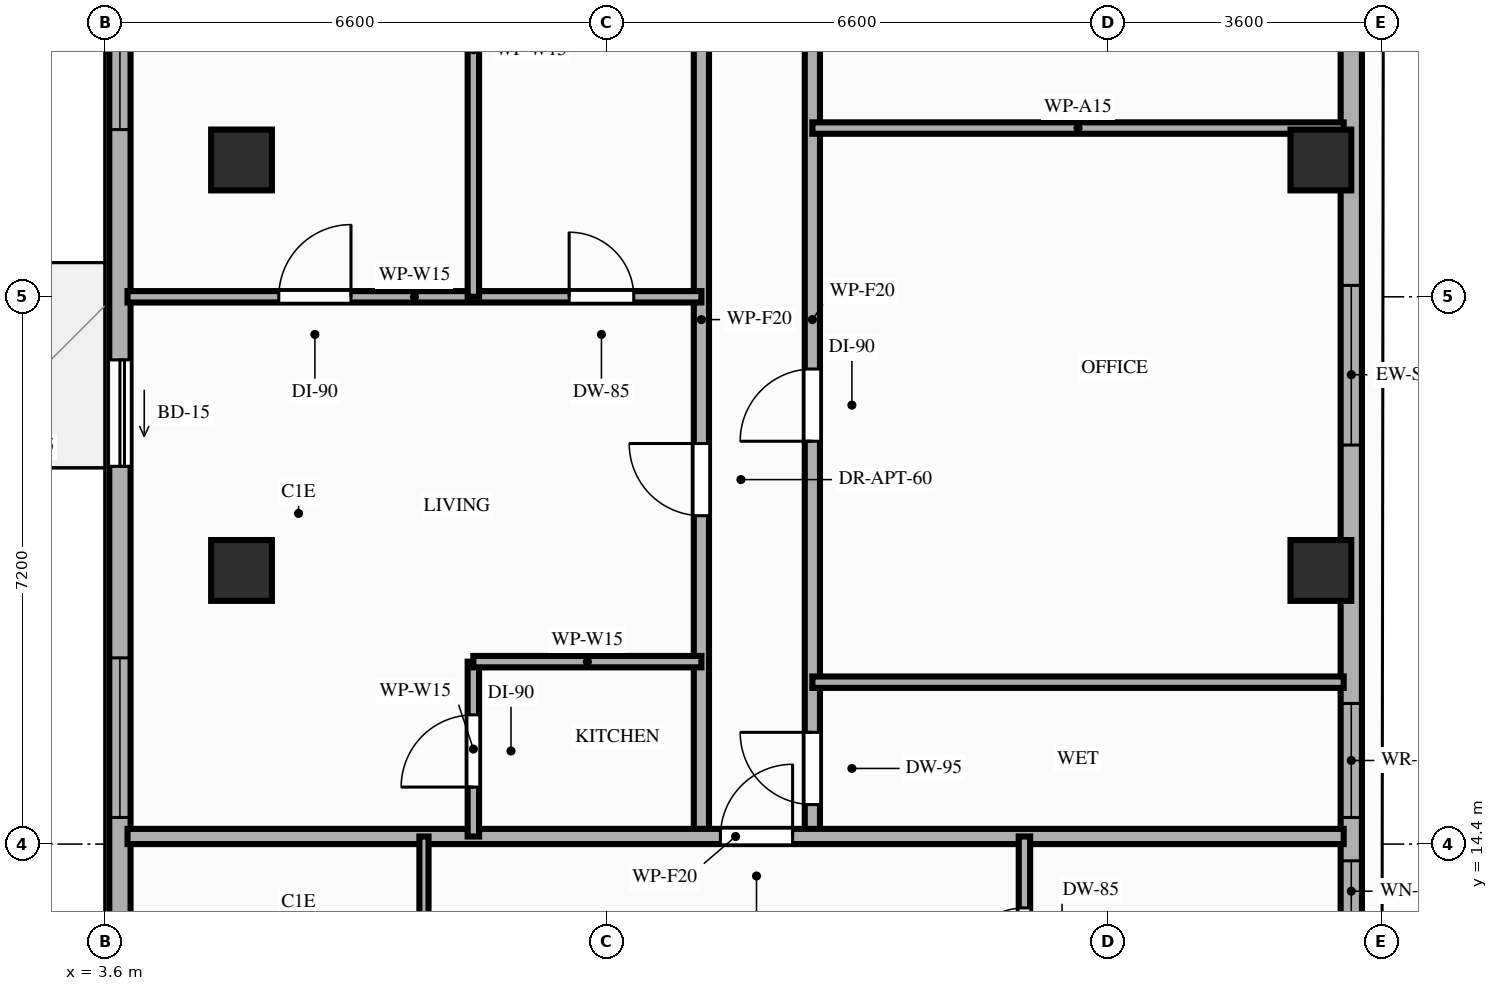
"""IFC4 building model, lengths in metres.
Left out: names, types, materials, properties, quantities, classifications, styles, units other than length and angle.
Written with IfcOpenShell. Run it as: python <this file> out.ifc"""

import sys

from ifc_helpers import new_model, si_unit, direction, frame, frame_2d, origin, origin_2d, place, context, subcontext, project, spatial, rectangle, extrude, element, fill, save


model = new_model("IFC4")
c1 = context("Model", 3, precision=1e-05, world=origin(), true_north=direction((0.0, 1.0)))
c2 = subcontext(c1, "Body", "Model", "MODEL_VIEW")
j1 = project(units=[si_unit("LENGTHUNIT", "METRE"), si_unit("PLANEANGLEUNIT", "RADIAN")], contexts=[c1])
p1 = place(None, origin())
s1 = spatial("IfcSite", under=j1, at=p1, CompositionType="ELEMENT")
p2 = place(p1, origin())
s2 = spatial("IfcBuilding", under=s1, at=p2, CompositionType="ELEMENT")
p3 = place(p2, frame((0.0, 0.0, 224.8)))
s3 = spatial("IfcBuildingStorey", under=s2, at=p3, CompositionType="ELEMENT", Elevation=224.8)
for number, where, z_axis, x_axis in (
    (1, (5.4, 18.0, 0.0), (0.0, 0.0, 1.0), (1.0, 0.0, 0.0)),
    (2, (19.6, 18.0, 0.0), (0.0, 0.0, 1.0), (1.0, 0.0, 0.0)),
    (3, (5.4, 23.4, 0.0), (0.0, 0.0, 1.0), (1.0, 0.0, 0.0)),
    (4, (19.6, 23.4, 0.0), (0.0, 0.0, 1.0), (1.0, 0.0, 0.0)),
):
    element("IfcColumn", number, at=place(p3, frame(where, z_axis=z_axis, x_axis=x_axis)), inside=s3, PredefinedType="COLUMN", context=c2, shape_type="SweptSolid", body=[
        extrude(rectangle(XDim=0.8, YDim=0.8, at=origin_2d()), origin(), (0.0, 0.0, 1.0), 3.2),
    ])
p4 = place(p3, frame((3.8, 42.1, 0.0), z_axis=(0.0, 0.0, 1.0), x_axis=(0.0, -1.0, 0.0)))
e5 = element("IfcWall", 5, at=p4, inside=s3, PredefinedType="STANDARD", context=c2, shape_type="SweptSolid", body=[
    extrude(rectangle(XDim=33.3, YDim=0.28, at=frame_2d((16.65, 0.0))), origin(), (0.0, 0.0, 1.0), 2.71),
])
p5 = place(p4, frame((21.33, 0.0, 0.0)))
e6 = element("IfcOpeningElement", 6, at=p5, cuts=e5, PredefinedType="OPENING", context=c2, shape_type="SweptSolid", body=[
    extrude(rectangle(XDim=1.4, YDim=2.1, at=frame_2d((0.7, 1.05))), frame((0.0, 0.15, 0.0), z_axis=(0.0, -1.0, 0.0), x_axis=(1.0, 0.0, 0.0)), (0.0, 0.0, 1.0), 0.3),
])
p6 = place(p4, frame((29.33, 0.0, 0.85)))
e7 = element("IfcOpeningElement", 7, at=p6, cuts=e5, PredefinedType="OPENING", context=c2, shape_type="SweptSolid", body=[
    extrude(rectangle(XDim=2.1, YDim=1.61, at=frame_2d((1.05, 0.805))), frame((0.0, 0.15, 0.0), z_axis=(0.0, -1.0, 0.0), x_axis=(1.0, 0.0, 0.0)), (0.0, 0.0, 1.0), 0.3),
])
p7 = place(p4, frame((16.2, 0.0, 0.85)))
e8 = element("IfcOpeningElement", 8, at=p7, cuts=e5, PredefinedType="OPENING", context=c2, shape_type="SweptSolid", body=[
    extrude(rectangle(XDim=2.1, YDim=1.61, at=frame_2d((1.05, 0.805))), frame((0.0, 0.15, 0.0), z_axis=(0.0, -1.0, 0.0), x_axis=(1.0, 0.0, 0.0)), (0.0, 0.0, 1.0), 0.3),
])
p8 = place(p4, frame((25.25, 0.0, 0.85)))
e9 = element("IfcOpeningElement", 9, at=p8, cuts=e5, PredefinedType="OPENING", context=c2, shape_type="SweptSolid", body=[
    extrude(rectangle(XDim=2.1, YDim=1.61, at=frame_2d((1.05, 0.805))), frame((0.0, 0.15, 0.0), z_axis=(0.0, -1.0, 0.0), x_axis=(1.0, 0.0, 0.0)), (0.0, 0.0, 1.0), 0.3),
])
p9 = place(p4, frame((9.75, 0.0, 0.85)))
e10 = element("IfcOpeningElement", 10, at=p9, cuts=e5, PredefinedType="OPENING", context=c2, shape_type="SweptSolid", body=[
    extrude(rectangle(XDim=2.1, YDim=1.61, at=frame_2d((1.05, 0.805))), frame((0.0, 0.15, 0.0), z_axis=(0.0, -1.0, 0.0), x_axis=(1.0, 0.0, 0.0)), (0.0, 0.0, 1.0), 0.3),
])
p10 = place(p4, frame((3.65, 0.0, 0.85)))
e11 = element("IfcOpeningElement", 11, at=p10, cuts=e5, PredefinedType="OPENING", context=c2, shape_type="SweptSolid", body=[
    extrude(rectangle(XDim=2.1, YDim=1.61, at=frame_2d((1.05, 0.805))), frame((0.0, 0.15, 0.0), z_axis=(0.0, -1.0, 0.0), x_axis=(1.0, 0.0, 0.0)), (0.0, 0.0, 1.0), 0.3),
])
p11 = place(p3, frame((20.0, 8.8, 0.0), z_axis=(0.0, 0.0, 1.0), x_axis=(0.0, 1.0, 0.0)))
e12 = element("IfcWall", 12, at=p11, inside=s3, PredefinedType="STANDARD", context=c2, shape_type="SweptSolid", body=[
    extrude(rectangle(XDim=23.55, YDim=0.28, at=frame_2d((11.775, 0.0))), origin(), (0.0, 0.0, 1.0), 2.51),
])
p12 = place(p11, frame((4.58, 0.0, 0.85)))
e13 = element("IfcOpeningElement", 13, at=p12, cuts=e12, PredefinedType="OPENING", context=c2, shape_type="SweptSolid", body=[
    extrude(rectangle(XDim=0.8, YDim=1.41, at=frame_2d((0.4, 0.705))), frame((0.0, 0.15, 0.0), z_axis=(0.0, -1.0, 0.0), x_axis=(1.0, 0.0, 0.0)), (0.0, 0.0, 1.0), 0.3),
])
p13 = place(p11, frame((5.95, 0.0, 0.85)))
e14 = element("IfcOpeningElement", 14, at=p13, cuts=e12, PredefinedType="OPENING", context=c2, shape_type="SweptSolid", body=[
    extrude(rectangle(XDim=1.5, YDim=1.41, at=frame_2d((0.75, 0.705))), frame((0.0, 0.15, 0.0), z_axis=(0.0, -1.0, 0.0), x_axis=(1.0, 0.0, 0.0)), (0.0, 0.0, 1.0), 0.3),
])
p14 = place(p11, frame((10.85, 0.0, 0.85)))
e15 = element("IfcOpeningElement", 15, at=p14, cuts=e12, PredefinedType="OPENING", context=c2, shape_type="SweptSolid", body=[
    extrude(rectangle(XDim=2.1, YDim=1.41, at=frame_2d((1.05, 0.705))), frame((0.0, 0.15, 0.0), z_axis=(0.0, -1.0, 0.0), x_axis=(1.0, 0.0, 0.0)), (0.0, 0.0, 1.0), 0.3),
])
p15 = place(p3, frame((11.45, 14.5, 0.0), z_axis=(0.0, 0.0, 1.0), x_axis=(0.0, 1.0, 0.0)))
e16 = element("IfcWall", 16, at=p15, inside=s3, PredefinedType="PARTITIONING", context=c2, shape_type="SweptSolid", body=[
    extrude(rectangle(XDim=13.6, YDim=0.2, at=frame_2d((6.8, 0.0))), origin(), (0.0, 0.0, 1.0), 2.51),
])
p16 = place(p15, frame((4.22, 0.0, 0.0)))
e17 = element("IfcOpeningElement", 17, at=p16, cuts=e16, PredefinedType="OPENING", context=c2, shape_type="SweptSolid", body=[
    extrude(rectangle(XDim=0.95, YDim=2.15, at=frame_2d((0.475, 1.075))), frame((0.0, 0.11, 0.0), z_axis=(0.0, -1.0, 0.0), x_axis=(1.0, 0.0, 0.0)), (0.0, 0.0, 1.0), 0.22),
])
p17 = place(p3, frame((12.91, 14.5, 0.0), z_axis=(0.0, 0.0, 1.0), x_axis=(0.0, 1.0, 0.0)))
e18 = element("IfcWall", 18, at=p17, inside=s3, PredefinedType="PARTITIONING", context=c2, shape_type="SweptSolid", body=[
    extrude(rectangle(XDim=13.6, YDim=0.2, at=frame_2d((6.8, 0.0))), origin(), (0.0, 0.0, 1.0), 2.51),
])
p18 = place(p17, frame((0.42, 0.0, 0.0)))
e19 = element("IfcOpeningElement", 19, at=p18, cuts=e18, PredefinedType="OPENING", context=c2, shape_type="SweptSolid", body=[
    extrude(rectangle(XDim=0.95, YDim=2.1, at=frame_2d((0.475, 1.05))), frame((0.0, 0.11, 0.0), z_axis=(0.0, -1.0, 0.0), x_axis=(1.0, 0.0, 0.0)), (0.0, 0.0, 1.0), 0.22),
])
p19 = place(p17, frame((5.2, 0.0, 0.0)))
e20 = element("IfcOpeningElement", 20, at=p19, cuts=e18, PredefinedType="OPENING", context=c2, shape_type="SweptSolid", body=[
    extrude(rectangle(XDim=0.95, YDim=2.15, at=frame_2d((0.475, 1.075))), frame((0.0, 0.11, 0.0), z_axis=(0.0, -1.0, 0.0), x_axis=(1.0, 0.0, 0.0)), (0.0, 0.0, 1.0), 0.22),
])
p20 = place(p17, frame((10.98, 0.0, 0.0)))
e21 = element("IfcOpeningElement", 21, at=p20, cuts=e18, PredefinedType="OPENING", context=c2, shape_type="SweptSolid", body=[
    extrude(rectangle(XDim=0.95, YDim=2.15, at=frame_2d((0.475, 1.075))), frame((0.0, 0.11, 0.0), z_axis=(0.0, -1.0, 0.0), x_axis=(1.0, 0.0, 0.0)), (0.0, 0.0, 1.0), 0.22),
])
p21 = place(p3, frame((3.9, 14.5, 0.0), z_axis=(0.0, 0.0, 1.0), x_axis=(1.0, 0.0, 0.0)))
e22 = element("IfcWall", 22, at=p21, inside=s3, PredefinedType="PARTITIONING", context=c2, shape_type="SweptSolid", body=[
    extrude(rectangle(XDim=16.0, YDim=0.2, at=frame_2d((8.0, 0.0))), origin(), (0.0, 0.0, 1.0), 2.51),
])
p22 = place(p21, frame((7.8, 0.0, 0.0)))
e23 = element("IfcOpeningElement", 23, at=p22, cuts=e22, PredefinedType="OPENING", context=c2, shape_type="SweptSolid", body=[
    extrude(rectangle(XDim=0.95, YDim=2.15, at=frame_2d((0.475, 1.075))), frame((0.0, 0.11, 0.0), z_axis=(0.0, -1.0, 0.0), x_axis=(1.0, 0.0, 0.0)), (0.0, 0.0, 1.0), 0.22),
])
p23 = place(p3, frame((7.8, 8.7, 0.0), z_axis=(0.0, 0.0, 1.0), x_axis=(0.0, 1.0, 0.0)))
e24 = element("IfcWall", 24, at=p23, inside=s3, PredefinedType="PARTITIONING", context=c2, shape_type="SweptSolid", body=[
    extrude(rectangle(XDim=5.8, YDim=0.12, at=frame_2d((2.9, 0.0))), origin(), (0.0, 0.0, 1.0), 2.51),
])
p24 = place(p23, frame((2.61, 0.0, 0.0)))
e25 = element("IfcOpeningElement", 25, at=p24, cuts=e24, PredefinedType="OPENING", context=c2, shape_type="SweptSolid", body=[
    extrude(rectangle(XDim=0.95, YDim=2.15, at=frame_2d((0.475, 1.075))), frame((0.0, 0.07, 0.0), z_axis=(0.0, -1.0, 0.0), x_axis=(1.0, 0.0, 0.0)), (0.0, 0.0, 1.0), 0.14),
])
p25 = place(p3, frame((15.7, 8.7, 0.0), z_axis=(0.0, 0.0, 1.0), x_axis=(0.0, 1.0, 0.0)))
e26 = element("IfcWall", 26, at=p25, inside=s3, PredefinedType="PARTITIONING", context=c2, shape_type="SweptSolid", body=[
    extrude(rectangle(XDim=5.8, YDim=0.15, at=frame_2d((2.9, 0.0))), origin(), (0.0, 0.0, 1.0), 2.51),
])
p26 = place(p25, frame((1.15, 0.0, 0.0)))
e27 = element("IfcOpeningElement", 27, at=p26, cuts=e26, PredefinedType="OPENING", context=c2, shape_type="SweptSolid", body=[
    extrude(rectangle(XDim=0.95, YDim=2.15, at=frame_2d((0.475, 1.075))), frame((0.0, 0.085, 0.0), z_axis=(0.0, -1.0, 0.0), x_axis=(1.0, 0.0, 0.0)), (0.0, 0.0, 1.0), 0.17),
])
p27 = place(p25, frame((4.01, 0.0, 0.0)))
e28 = element("IfcOpeningElement", 28, at=p27, cuts=e26, PredefinedType="OPENING", context=c2, shape_type="SweptSolid", body=[
    extrude(rectangle(XDim=0.85, YDim=2.1, at=frame_2d((0.425, 1.05))), frame((0.0, 0.085, 0.0), z_axis=(0.0, -1.0, 0.0), x_axis=(1.0, 0.0, 0.0)), (0.0, 0.0, 1.0), 0.17),
])
p28 = place(p3, frame((3.9, 21.6, 0.0), z_axis=(0.0, 0.0, 1.0), x_axis=(1.0, 0.0, 0.0)))
e29 = element("IfcWall", 29, at=p28, inside=s3, PredefinedType="PARTITIONING", context=c2, shape_type="SweptSolid", body=[
    extrude(rectangle(XDim=7.55, YDim=0.15, at=frame_2d((3.775, 0.0))), origin(), (0.0, 0.0, 1.0), 2.51),
])
p29 = place(p28, frame((1.99, 0.0, 0.0)))
e30 = element("IfcOpeningElement", 30, at=p29, cuts=e29, PredefinedType="OPENING", context=c2, shape_type="SweptSolid", body=[
    extrude(rectangle(XDim=0.95, YDim=2.15, at=frame_2d((0.475, 1.075))), frame((0.0, 0.085, 0.0), z_axis=(0.0, -1.0, 0.0), x_axis=(1.0, 0.0, 0.0)), (0.0, 0.0, 1.0), 0.17),
])
p30 = place(p28, frame((5.81, 0.0, 0.0)))
e31 = element("IfcOpeningElement", 31, at=p30, cuts=e29, PredefinedType="OPENING", context=c2, shape_type="SweptSolid", body=[
    extrude(rectangle(XDim=0.85, YDim=2.1, at=frame_2d((0.425, 1.05))), frame((0.0, 0.085, 0.0), z_axis=(0.0, -1.0, 0.0), x_axis=(1.0, 0.0, 0.0)), (0.0, 0.0, 1.0), 0.17),
])
p31 = place(p3, frame((8.45, 21.6, 0.0), z_axis=(0.0, 0.0, 1.0), x_axis=(0.0, 1.0, 0.0)))
e32 = element("IfcWall", 32, at=p31, inside=s3, PredefinedType="PARTITIONING", context=c2, shape_type="SweptSolid", body=[
    extrude(rectangle(XDim=6.5, YDim=0.15, at=frame_2d((3.25, 0.0))), origin(), (0.0, 0.0, 1.0), 2.51),
])
p32 = place(p3, frame((8.45, 14.5, 0.0), z_axis=(0.0, 0.0, 1.0), x_axis=(0.0, 1.0, 0.0)))
e33 = element("IfcWall", 33, at=p32, inside=s3, PredefinedType="PARTITIONING", context=c2, shape_type="SweptSolid", body=[
    extrude(rectangle(XDim=2.3, YDim=0.15, at=frame_2d((1.15, 0.0))), origin(), (0.0, 0.0, 1.0), 2.71),
])
p33 = place(p32, frame((0.65, 0.0, 0.0)))
e34 = element("IfcOpeningElement", 34, at=p33, cuts=e33, PredefinedType="OPENING", context=c2, shape_type="SweptSolid", body=[
    extrude(rectangle(XDim=0.95, YDim=2.15, at=frame_2d((0.475, 1.075))), frame((0.0, 0.085, 0.0), z_axis=(0.0, -1.0, 0.0), x_axis=(1.0, 0.0, 0.0)), (0.0, 0.0, 1.0), 0.17),
])
p34 = place(p3, frame((8.45, 16.8, 0.0), z_axis=(0.0, 0.0, 1.0), x_axis=(1.0, 0.0, 0.0)))
e35 = element("IfcWall", 35, at=p34, inside=s3, PredefinedType="PARTITIONING", context=c2, shape_type="SweptSolid", body=[
    extrude(rectangle(XDim=3.0, YDim=0.15, at=frame_2d((1.5, 0.0))), origin(), (0.0, 0.0, 1.0), 2.71),
])
for number, where, z_axis, x_axis in (
    (36, (12.91, 16.53, 0.0), (0.0, 0.0, 1.0), (1.0, 0.0, 0.0)),
    (37, (12.91, 23.82, 0.0), (0.0, 0.0, 1.0), (1.0, 0.0, 0.0)),
):
    element("IfcWall", number, at=place(p3, frame(where, z_axis=z_axis, x_axis=x_axis)), inside=s3, PredefinedType="PARTITIONING", context=c2, shape_type="SweptSolid", body=[
        extrude(rectangle(XDim=6.99, YDim=0.15, at=frame_2d((3.495, 0.0))), origin(), (0.0, 0.0, 1.0), 2.51),
    ])
p35 = place(p5, origin())
e38 = element("IfcDoor", 38, at=p35, inside=s3, OperationType="SLIDING_TO_RIGHT", PredefinedType="DOOR", context=c2, shape_type="SweptSolid", body=[
    extrude(rectangle(XDim=1.4, YDim=2.1, at=frame_2d((0.7, 1.05))), frame((0.0, 0.025, 0.0), z_axis=(0.0, -1.0, 0.0), x_axis=(1.0, 0.0, 0.0)), (0.0, 0.0, 1.0), 0.05),
])
fill(e6, e38)
p36 = place(p12, origin())
e39 = element("IfcWindow", 39, at=p36, inside=s3, PartitioningType="SINGLE_PANEL", PredefinedType="WINDOW", context=c2, shape_type="SweptSolid", body=[
    extrude(rectangle(XDim=0.8, YDim=1.41, at=frame_2d((0.4, 0.705))), frame((0.0, 0.03, 0.0), z_axis=(0.0, -1.0, 0.0), x_axis=(1.0, 0.0, 0.0)), (0.0, 0.0, 1.0), 0.06),
])
fill(e13, e39)
p37 = place(p7, origin())
e40 = element("IfcWindow", 40, at=p37, inside=s3, PartitioningType="SINGLE_PANEL", PredefinedType="WINDOW", context=c2, shape_type="SweptSolid", body=[
    extrude(rectangle(XDim=2.1, YDim=1.61, at=frame_2d((1.05, 0.805))), frame((0.0, 0.03, 0.0), z_axis=(0.0, -1.0, 0.0), x_axis=(1.0, 0.0, 0.0)), (0.0, 0.0, 1.0), 0.06),
])
fill(e8, e40)
p38 = place(p8, origin())
e41 = element("IfcWindow", 41, at=p38, inside=s3, PartitioningType="SINGLE_PANEL", PredefinedType="WINDOW", context=c2, shape_type="SweptSolid", body=[
    extrude(rectangle(XDim=2.1, YDim=1.61, at=frame_2d((1.05, 0.805))), frame((0.0, 0.03, 0.0), z_axis=(0.0, -1.0, 0.0), x_axis=(1.0, 0.0, 0.0)), (0.0, 0.0, 1.0), 0.06),
])
fill(e9, e41)
p39 = place(p13, origin())
e42 = element("IfcWindow", 42, at=p39, inside=s3, PartitioningType="SINGLE_PANEL", PredefinedType="WINDOW", context=c2, shape_type="SweptSolid", body=[
    extrude(rectangle(XDim=1.5, YDim=1.41, at=frame_2d((0.75, 0.705))), frame((0.0, 0.03, 0.0), z_axis=(0.0, -1.0, 0.0), x_axis=(1.0, 0.0, 0.0)), (0.0, 0.0, 1.0), 0.06),
])
fill(e14, e42)
p40 = place(p14, origin())
e43 = element("IfcWindow", 43, at=p40, inside=s3, PartitioningType="SINGLE_PANEL", PredefinedType="WINDOW", context=c2, shape_type="SweptSolid", body=[
    extrude(rectangle(XDim=2.1, YDim=1.41, at=frame_2d((1.05, 0.705))), frame((0.0, 0.03, 0.0), z_axis=(0.0, -1.0, 0.0), x_axis=(1.0, 0.0, 0.0)), (0.0, 0.0, 1.0), 0.06),
])
fill(e15, e43)
p41 = place(p22, origin())
e44 = element("IfcDoor", 44, at=p41, inside=s3, OperationType="SINGLE_SWING_RIGHT", PredefinedType="DOOR", context=c2, shape_type="SweptSolid", body=[
    extrude(rectangle(XDim=0.95, YDim=2.15, at=frame_2d((0.475, 1.075))), frame((0.0, 0.025, 0.0), z_axis=(0.0, -1.0, 0.0), x_axis=(1.0, 0.0, 0.0)), (0.0, 0.0, 1.0), 0.05),
])
fill(e23, e44)
p42 = place(p27, origin())
e45 = element("IfcDoor", 45, at=p42, inside=s3, OperationType="SINGLE_SWING_LEFT", PredefinedType="DOOR", context=c2, shape_type="SweptSolid", body=[
    extrude(rectangle(XDim=0.85, YDim=2.1, at=frame_2d((0.425, 1.05))), frame((0.0, 0.025, 0.0), z_axis=(0.0, -1.0, 0.0), x_axis=(1.0, 0.0, 0.0)), (0.0, 0.0, 1.0), 0.05),
])
fill(e28, e45)
p43 = place(p16, origin())
e46 = element("IfcDoor", 46, at=p43, inside=s3, OperationType="SINGLE_SWING_RIGHT", PredefinedType="DOOR", context=c2, shape_type="SweptSolid", body=[
    extrude(rectangle(XDim=0.95, YDim=2.15, at=frame_2d((0.475, 1.075))), frame((0.0, 0.025, 0.0), z_axis=(0.0, -1.0, 0.0), x_axis=(1.0, 0.0, 0.0)), (0.0, 0.0, 1.0), 0.05),
])
fill(e17, e46)
p44 = place(p33, origin())
e47 = element("IfcDoor", 47, at=p44, inside=s3, OperationType="SINGLE_SWING_LEFT", PredefinedType="DOOR", context=c2, shape_type="SweptSolid", body=[
    extrude(rectangle(XDim=0.95, YDim=2.15, at=frame_2d((0.475, 1.075))), frame((0.0, 0.025, 0.0), z_axis=(0.0, -1.0, 0.0), x_axis=(1.0, 0.0, 0.0)), (0.0, 0.0, 1.0), 0.05),
])
fill(e34, e47)
p45 = place(p29, origin())
e48 = element("IfcDoor", 48, at=p45, inside=s3, OperationType="SINGLE_SWING_RIGHT", PredefinedType="DOOR", context=c2, shape_type="SweptSolid", body=[
    extrude(rectangle(XDim=0.95, YDim=2.15, at=frame_2d((0.475, 1.075))), frame((0.0, 0.025, 0.0), z_axis=(0.0, -1.0, 0.0), x_axis=(1.0, 0.0, 0.0)), (0.0, 0.0, 1.0), 0.05),
])
fill(e30, e48)
p46 = place(p30, origin())
e49 = element("IfcDoor", 49, at=p46, inside=s3, OperationType="SINGLE_SWING_LEFT", PredefinedType="DOOR", context=c2, shape_type="SweptSolid", body=[
    extrude(rectangle(XDim=0.85, YDim=2.1, at=frame_2d((0.425, 1.05))), frame((0.0, 0.025, 0.0), z_axis=(0.0, -1.0, 0.0), x_axis=(1.0, 0.0, 0.0)), (0.0, 0.0, 1.0), 0.05),
])
fill(e31, e49)
p47 = place(p18, origin())
e50 = element("IfcDoor", 50, at=p47, inside=s3, OperationType="SINGLE_SWING_RIGHT", PredefinedType="DOOR", context=c2, shape_type="SweptSolid", body=[
    extrude(rectangle(XDim=0.95, YDim=2.1, at=frame_2d((0.475, 1.05))), frame((0.0, 0.025, 0.0), z_axis=(0.0, -1.0, 0.0), x_axis=(1.0, 0.0, 0.0)), (0.0, 0.0, 1.0), 0.05),
])
fill(e19, e50)
p48 = place(p19, origin())
e51 = element("IfcDoor", 51, at=p48, inside=s3, OperationType="SINGLE_SWING_LEFT", PredefinedType="DOOR", context=c2, shape_type="SweptSolid", body=[
    extrude(rectangle(XDim=0.95, YDim=2.15, at=frame_2d((0.475, 1.075))), frame((0.0, 0.025, 0.0), z_axis=(0.0, -1.0, 0.0), x_axis=(1.0, 0.0, 0.0)), (0.0, 0.0, 1.0), 0.05),
])
fill(e20, e51)
save(model, sys.argv[1])
